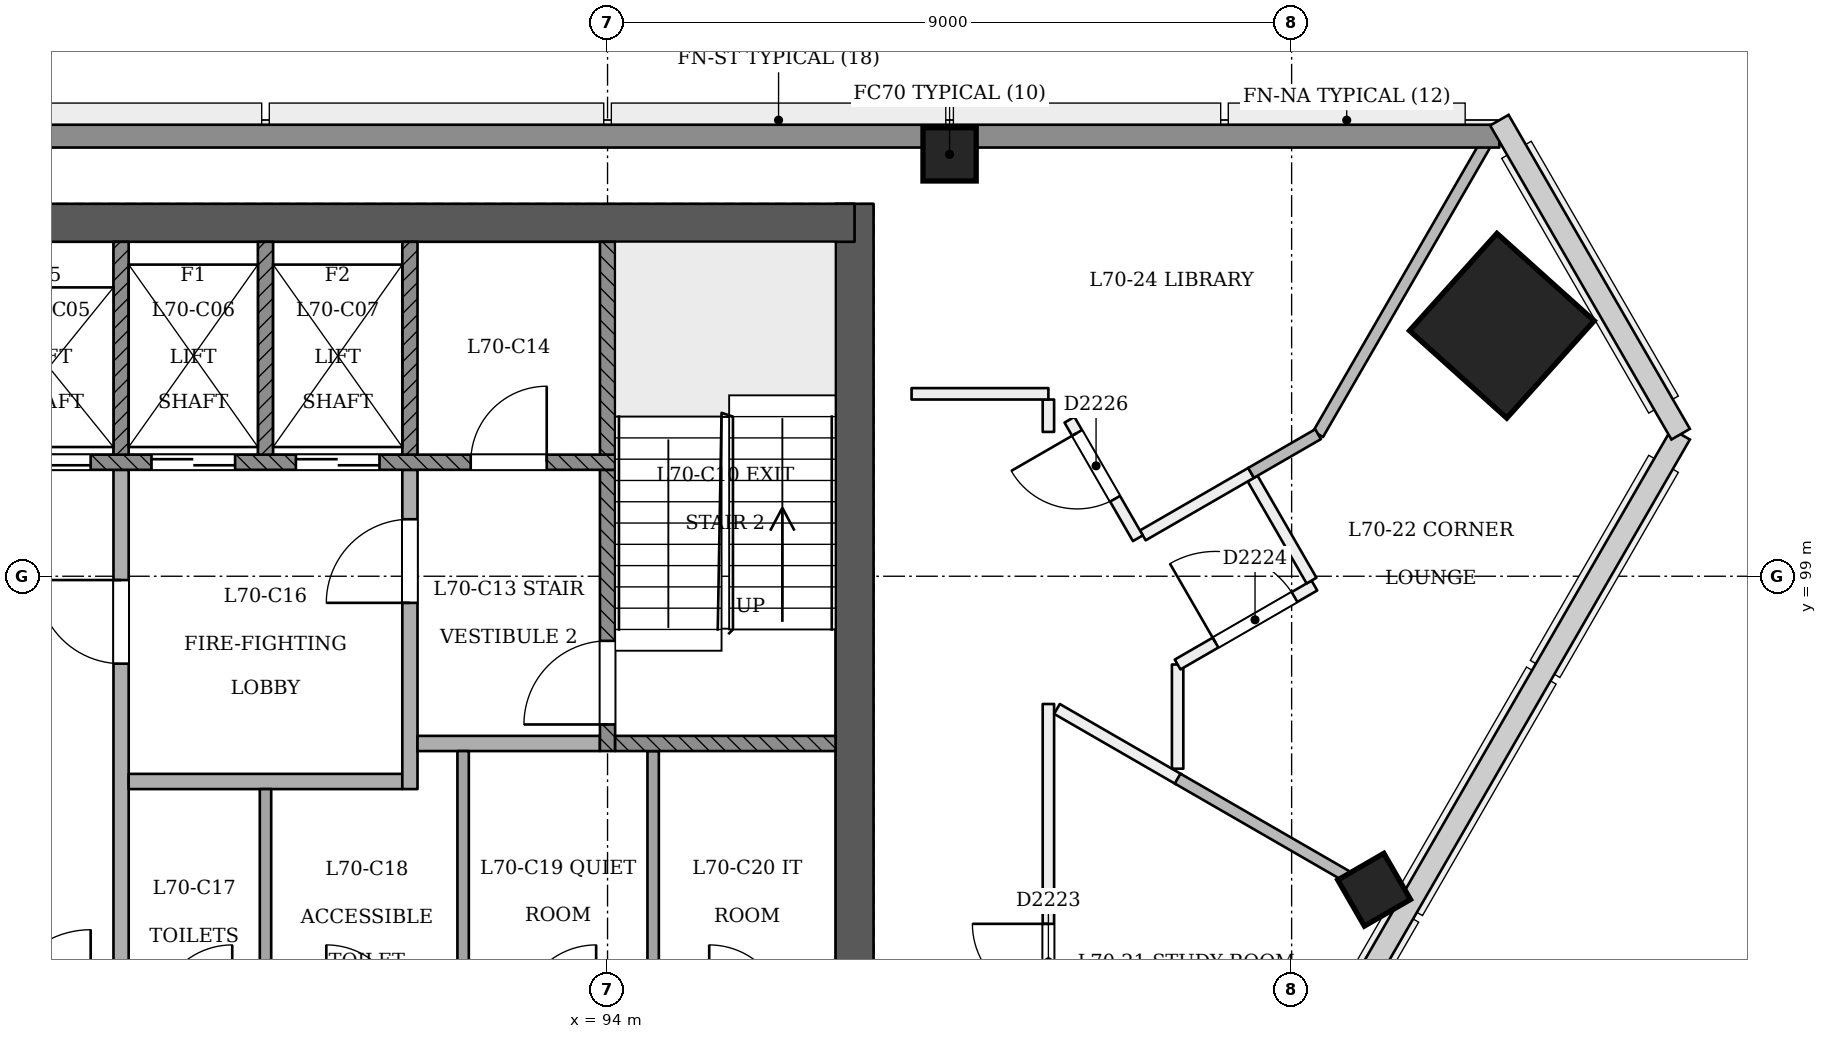
"""IFC4 building model, lengths in metres.
Left out: names, types, materials, properties, quantities, classifications, styles, units other than length and angle.
Written with IfcOpenShell. Run it as: python <this file> out.ifc"""

import sys

from ifc_helpers import new_model, si_unit, direction, frame, frame_2d, origin, origin_2d, place, context, subcontext, project, spatial, rectangle, extrude, element, fill, save


model = new_model("IFC4")
c1 = context("Model", 3, precision=1e-05, world=origin(), true_north=direction((0.0, 1.0)))
c2 = subcontext(c1, "Body", "Model", "MODEL_VIEW")
j1 = project(units=[si_unit("LENGTHUNIT", "METRE"), si_unit("PLANEANGLEUNIT", "RADIAN")], contexts=[c1])
p1 = place(None, origin())
s1 = spatial("IfcSite", under=j1, at=p1, CompositionType="ELEMENT")
p2 = place(p1, origin())
s2 = spatial("IfcBuilding", under=s1, at=p2, CompositionType="ELEMENT")
p3 = place(p2, frame((0.0, 0.0, 271.6)))
s3 = spatial("IfcBuildingStorey", under=s2, at=p3, CompositionType="ELEMENT", Elevation=271.6)
p4 = place(p3, frame((97.25, 93.15, 0.0), z_axis=(0.0, 0.0, 1.0), x_axis=(0.0, 1.0, 0.0)))
e1 = element("IfcWall", 1, at=p4, inside=s3, PredefinedType="SHEAR", context=c2, shape_type="SweptSolid", body=[
    extrude(rectangle(XDim=10.75, YDim=0.5, at=frame_2d((5.375, 0.0))), origin(), (0.0, 0.0, 1.0), 3.6),
])
p5 = place(p3, frame((97.25, 103.65, 0.0), z_axis=(0.0, 0.0, 1.0), x_axis=(-1.0, 0.0, 0.0)))
e2 = element("IfcWall", 2, at=p5, inside=s3, PredefinedType="SHEAR", context=c2, shape_type="SweptSolid", body=[
    extrude(rectangle(XDim=24.75, YDim=0.5, at=frame_2d((12.375, 0.0))), origin(), (0.0, 0.0, 1.0), 3.6),
])
p6 = place(p3, frame((105.8, 102.284, 0.0), z_axis=(-0.028403739082, 0.009219352065, 0.999554016126), x_axis=(0.500765083006, -0.865298216412, 0.022210995403)))
e3 = element("IfcColumn", 3, at=p6, inside=s3, PredefinedType="COLUMN", context=c2, shape_type="SweptSolid", body=[
    extrude(rectangle(XDim=1.72, YDim=1.72, at=origin_2d()), origin(), (0.0, 0.0, 1.0), 3.602),
])
p7 = place(p3, frame((98.5, 104.55, 0.0), z_axis=(0.0, 0.0, 1.0), x_axis=(1.0, 0.0, 0.0)))
e4 = element("IfcColumn", 4, at=p7, inside=s3, PredefinedType="COLUMN", context=c2, shape_type="SweptSolid", body=[
    extrude(rectangle(XDim=0.7, YDim=0.7, at=origin_2d()), origin(), (0.0, 0.0, 1.0), 3.6),
])
p8 = place(p3, frame((104.113, 94.829, -0.021), z_axis=(-0.022222852987, 0.038483477124, 0.999012095419), x_axis=(-0.500174611287, -0.865639447942, 0.022219459744)))
e5 = element("IfcColumn", 5, at=p8, inside=s3, PredefinedType="COLUMN", context=c2, shape_type="SweptSolid", body=[
    extrude(rectangle(XDim=0.7, YDim=0.7, at=origin_2d()), origin(), (0.0, 0.0, 1.0), 3.604),
])
p9 = place(p3, frame((99.8, 90.6, 0.0), z_axis=(0.0, 0.0, 1.0), x_axis=(0.0, 1.0, 0.0)))
e6 = element("IfcWall", 6, at=p9, inside=s3, PredefinedType="PARTITIONING", context=c2, shape_type="SweptSolid", body=[
    extrude(rectangle(XDim=6.719, YDim=0.15, at=frame_2d((3.36, 0.0))), origin(), (0.0, 0.0, 1.0), 3.2),
])
p10 = place(p9, frame((2.827, 0.0, 0.0)))
e7 = element("IfcOpeningElement", 7, at=p10, cuts=e6, PredefinedType="OPENING", context=c2, shape_type="SweptSolid", body=[
    extrude(rectangle(XDim=1.0, YDim=2.1, at=frame_2d((0.5, 1.05))), frame((0.0, 0.085, 0.0), z_axis=(0.0, -1.0, 0.0), x_axis=(1.0, 0.0, 0.0)), (0.0, 0.0, 1.0), 0.171),
])
p11 = place(p3, frame((99.913, 97.254, 0.0), z_axis=(0.0, 0.0, 1.0), x_axis=(0.866021029023, -0.500007577232, 0.0)))
e8 = element("IfcWall", 8, at=p11, inside=s3, PredefinedType="PARTITIONING", context=c2, shape_type="SweptSolid", body=[
    extrude(rectangle(XDim=1.853, YDim=0.15, at=frame_2d((0.927, 0.0))), origin(), (0.0, 0.0, 1.0), 3.2),
])
p12 = place(p3, frame((101.5, 96.468, 0.0), z_axis=(0.0, 0.0, 1.0), x_axis=(0.0, 1.0, 0.0)))
e9 = element("IfcWall", 9, at=p12, inside=s3, PredefinedType="PARTITIONING", context=c2, shape_type="SweptSolid", body=[
    extrude(rectangle(XDim=1.371, YDim=0.15, at=frame_2d((0.686, 0.0))), origin(), (0.0, 0.0, 1.0), 3.2),
])
p13 = place(p3, frame((101.5, 97.839, 0.0), z_axis=(0.0, 0.0, 1.0), x_axis=(0.866029041019, 0.499993700073, 0.0)))
e10 = element("IfcWall", 10, at=p13, inside=s3, PredefinedType="PARTITIONING", context=c2, shape_type="SweptSolid", body=[
    extrude(rectangle(XDim=2.078, YDim=0.15, at=frame_2d((1.039, 0.0))), origin(), (0.0, 0.0, 1.0), 3.2),
])
p14 = place(p13, frame((0.576, 0.0, 0.0)))
e11 = element("IfcOpeningElement", 11, at=p14, cuts=e10, PredefinedType="OPENING", context=c2, shape_type="SweptSolid", body=[
    extrude(rectangle(XDim=1.2, YDim=2.1, at=frame_2d((0.6, 1.05))), frame((0.0, 0.085, 0.0), z_axis=(0.0, -1.0, 0.0), x_axis=(1.0, 0.0, 0.0)), (0.0, 0.0, 1.0), 0.171),
])
p15 = place(p3, frame((103.262, 98.943, 0.0), z_axis=(0.0, 0.0, 1.0), x_axis=(-0.499899694197, 0.866083307622, 0.0)))
e12 = element("IfcWall", 12, at=p15, inside=s3, PredefinedType="PARTITIONING", context=c2, shape_type="SweptSolid", body=[
    extrude(rectangle(XDim=1.55, YDim=0.15, at=frame_2d((0.775, 0.0))), origin(), (0.0, 0.0, 1.0), 3.2),
])
p16 = place(p3, frame((102.467, 100.36, 0.0), z_axis=(0.0, 0.0, 1.0), x_axis=(-0.866015045157, -0.50001794124, 0.0)))
e13 = element("IfcWall", 13, at=p16, inside=s3, PredefinedType="PARTITIONING", context=c2, shape_type="SweptSolid", body=[
    extrude(rectangle(XDim=1.645, YDim=0.15, at=frame_2d((0.823, 0.0))), origin(), (0.0, 0.0, 1.0), 3.2),
])
p17 = place(p3, frame((100.977, 99.5, 0.0), z_axis=(0.0, 0.0, 1.0), x_axis=(-0.499961193289, 0.866047807691, 0.0)))
e14 = element("IfcWall", 14, at=p17, inside=s3, PredefinedType="PARTITIONING", context=c2, shape_type="SweptSolid", body=[
    extrude(rectangle(XDim=1.8, YDim=0.15, at=frame_2d((0.9, 0.0))), origin(), (0.0, 0.0, 1.0), 3.2),
])
p18 = place(p17, frame((0.6, 0.0, 0.0)))
e15 = element("IfcOpeningElement", 15, at=p18, cuts=e14, PredefinedType="OPENING", context=c2, shape_type="SweptSolid", body=[
    extrude(rectangle(XDim=1.0, YDim=2.1, at=frame_2d((0.5, 1.05))), frame((0.0, 0.085, 0.0), z_axis=(0.0, -1.0, 0.0), x_axis=(1.0, 0.0, 0.0)), (0.0, 0.0, 1.0), 0.171),
])
p19 = place(p3, frame((99.8, 100.899, 0.0), z_axis=(0.0, 0.0, 1.0), x_axis=(0.0, 1.0, 0.0)))
e16 = element("IfcWall", 16, at=p19, inside=s3, PredefinedType="PARTITIONING", context=c2, shape_type="SweptSolid", body=[
    extrude(rectangle(XDim=0.426, YDim=0.15, at=frame_2d((0.213, 0.0))), origin(), (0.0, 0.0, 1.0), 3.2),
])
p20 = place(p3, frame((99.8, 101.4, 0.0), z_axis=(0.0, 0.0, 1.0), x_axis=(-1.0, 0.0, 0.0)))
e17 = element("IfcWall", 17, at=p20, inside=s3, PredefinedType="PARTITIONING", context=c2, shape_type="SweptSolid", body=[
    extrude(rectangle(XDim=1.8, YDim=0.15, at=frame_2d((0.9, 0.0))), origin(), (0.0, 0.0, 1.0), 3.2),
])
p21 = place(p3, frame((104.415, 94.655, 0.0), z_axis=(0.0, 0.0, 1.0), x_axis=(-0.866011654119, 0.500023814363, 0.0)))
e18 = element("IfcWall", 18, at=p21, inside=s3, PredefinedType="PARTITIONING", context=c2, shape_type="SweptSolid", body=[
    extrude(rectangle(XDim=3.366, YDim=0.15, at=frame_2d((1.683, 0.0))), origin(), (0.0, 0.0, 1.0), 2.7),
])
p22 = place(p3, frame((105.675, 104.9, 0.0), z_axis=(0.0, 0.0, 1.0), x_axis=(-0.500014543469, -0.866017006946, 0.0)))
e19 = element("IfcWall", 19, at=p22, inside=s3, PredefinedType="PARTITIONING", context=c2, shape_type="SweptSolid", body=[
    extrude(rectangle(XDim=4.655, YDim=0.15, at=frame_2d((2.327, 0.0))), origin(), (0.0, 0.0, 1.0), 2.7),
])
p23 = place(p3, frame((103.348, 100.869, 0.0), z_axis=(0.0, 0.0, 1.0), x_axis=(-0.866049759928, -0.499957811549, 0.0)))
e20 = element("IfcWall", 20, at=p23, inside=s3, PredefinedType="PARTITIONING", context=c2, shape_type="SweptSolid", body=[
    extrude(rectangle(XDim=1.018, YDim=0.15, at=frame_2d((0.509, 0.0))), origin(), (0.0, 0.0, 1.0), 3.2),
])
p24 = place(p3, frame((64.267, 104.79, 0.0), z_axis=(0.0, 0.0, 1.0), x_axis=(1.0, 0.0, 0.0)))
e21 = element("IfcWall", 21, at=p24, inside=s3, PredefinedType="SOLIDWALL", context=c2, shape_type="SweptSolid", body=[
    extrude(rectangle(XDim=41.466, YDim=0.3, at=frame_2d((20.733, 0.0))), origin(), (0.0, 0.0, 1.0), 2.7),
])
p25 = place(p3, frame((87.6, 93.4, 0.0), z_axis=(0.0, 0.0, 1.0), x_axis=(0.0, 1.0, 0.0)))
e22 = element("IfcWall", 22, at=p25, inside=s3, PredefinedType="PARTITIONING", context=c2, shape_type="SweptSolid", body=[
    extrude(rectangle(XDim=7.0, YDim=0.2, at=frame_2d((3.5, 0.0))), origin(), (0.0, 0.0, 1.0), 3.2),
])
p26 = place(p25, frame((4.45, 0.0, 0.0)))
e23 = element("IfcOpeningElement", 23, at=p26, cuts=e22, PredefinedType="OPENING", context=c2, shape_type="SweptSolid", body=[
    extrude(rectangle(XDim=1.1, YDim=2.1, at=frame_2d((0.55, 1.05))), frame((0.0, 0.11, 0.0), z_axis=(0.0, -1.0, 0.0), x_axis=(1.0, 0.0, 0.0)), (0.0, 0.0, 1.0), 0.221),
])
p27 = place(p3, frame((89.5, 93.4, 0.0), z_axis=(0.0, 0.0, 1.0), x_axis=(0.0, 1.0, 0.0)))
e24 = element("IfcWall", 24, at=p27, inside=s3, PredefinedType="PARTITIONING", context=c2, shape_type="SweptSolid", body=[
    extrude(rectangle(XDim=2.8, YDim=0.15, at=frame_2d((1.4, 0.0))), origin(), (0.0, 0.0, 1.0), 3.2),
])
for number, where, z_axis, x_axis in (
    (25, (92.1, 93.4, 0.0), (0.0, 0.0, 1.0), (0.0, 1.0, 0.0)),
    (26, (94.6, 93.4, 0.0), (0.0, 0.0, 1.0), (0.0, 1.0, 0.0)),
):
    element("IfcWall", number, at=place(p3, frame(where, z_axis=z_axis, x_axis=x_axis)), inside=s3, PredefinedType="PARTITIONING", context=c2, shape_type="SweptSolid", body=[
        extrude(rectangle(XDim=3.3, YDim=0.15, at=frame_2d((1.65, 0.0))), origin(), (0.0, 0.0, 1.0), 3.2),
    ])
p28 = place(p3, frame((87.7, 96.3, 0.0), z_axis=(0.0, 0.0, 1.0), x_axis=(1.0, 0.0, 0.0)))
e27 = element("IfcWall", 27, at=p28, inside=s3, PredefinedType="PARTITIONING", context=c2, shape_type="SweptSolid", body=[
    extrude(rectangle(XDim=3.6, YDim=0.2, at=frame_2d((1.8, 0.0))), origin(), (0.0, 0.0, 1.0), 3.2),
])
p29 = place(p3, frame((91.4, 96.2, 0.0), z_axis=(0.0, 0.0, 1.0), x_axis=(0.0, 1.0, 0.0)))
e28 = element("IfcWall", 28, at=p29, inside=s3, PredefinedType="PARTITIONING", context=c2, shape_type="SweptSolid", body=[
    extrude(rectangle(XDim=4.2, YDim=0.2, at=frame_2d((2.1, 0.0))), origin(), (0.0, 0.0, 1.0), 3.2),
])
p30 = place(p29, frame((2.45, 0.0, 0.0)))
e29 = element("IfcOpeningElement", 29, at=p30, cuts=e28, PredefinedType="OPENING", context=c2, shape_type="SweptSolid", body=[
    extrude(rectangle(XDim=1.1, YDim=2.1, at=frame_2d((0.55, 1.05))), frame((0.0, 0.11, 0.0), z_axis=(0.0, -1.0, 0.0), x_axis=(1.0, 0.0, 0.0)), (0.0, 0.0, 1.0), 0.221),
])
p31 = place(p3, frame((91.5, 96.8, 0.0), z_axis=(0.0, 0.0, 1.0), x_axis=(1.0, 0.0, 0.0)))
e30 = element("IfcWall", 30, at=p31, inside=s3, PredefinedType="PARTITIONING", context=c2, shape_type="SweptSolid", body=[
    extrude(rectangle(XDim=2.4, YDim=0.2, at=frame_2d((1.2, 0.0))), origin(), (0.0, 0.0, 1.0), 3.2),
])
p32 = place(p3, frame((94.0, 96.7, 0.0), z_axis=(0.0, 0.0, 1.0), x_axis=(0.0, 1.0, 0.0)))
e31 = element("IfcWall", 31, at=p32, inside=s3, PredefinedType="SOLIDWALL", context=c2, shape_type="SweptSolid", body=[
    extrude(rectangle(XDim=3.7, YDim=0.2, at=frame_2d((1.85, 0.0))), origin(), (0.0, 0.0, 1.0), 3.2),
])
p33 = place(p32, frame((0.35, 0.0, 0.0)))
e32 = element("IfcOpeningElement", 32, at=p33, cuts=e31, PredefinedType="OPENING", context=c2, shape_type="SweptSolid", body=[
    extrude(rectangle(XDim=1.1, YDim=2.1, at=frame_2d((0.55, 1.05))), frame((0.0, 0.11, 0.0), z_axis=(0.0, -1.0, 0.0), x_axis=(1.0, 0.0, 0.0)), (0.0, 0.0, 1.0), 0.221),
])
p34 = place(p3, frame((94.1, 96.8, 0.0), z_axis=(0.0, 0.0, 1.0), x_axis=(1.0, 0.0, 0.0)))
e33 = element("IfcWall", 33, at=p34, inside=s3, PredefinedType="SOLIDWALL", context=c2, shape_type="SweptSolid", body=[
    extrude(rectangle(XDim=2.9, YDim=0.2, at=frame_2d((1.45, 0.0))), origin(), (0.0, 0.0, 1.0), 3.2),
])
p35 = place(p3, frame((75.9, 100.5, 0.0), z_axis=(0.0, 0.0, 1.0), x_axis=(1.0, 0.0, 0.0)))
e34 = element("IfcWall", 34, at=p35, inside=s3, PredefinedType="SOLIDWALL", context=c2, shape_type="SweptSolid", body=[
    extrude(rectangle(XDim=18.2, YDim=0.2, at=frame_2d((9.1, 0.0))), origin(), (0.0, 0.0, 1.0), 3.2),
])
p36 = place(p35, frame((2.6, 0.0, 0.0)))
e35 = element("IfcOpeningElement", 35, at=p36, cuts=e34, PredefinedType="OPENING", context=c2, shape_type="SweptSolid", body=[
    extrude(rectangle(XDim=1.1, YDim=2.1, at=frame_2d((0.55, 1.05))), frame((0.0, 0.11, 0.0), z_axis=(0.0, -1.0, 0.0), x_axis=(1.0, 0.0, 0.0)), (0.0, 0.0, 1.0), 0.221),
])
p37 = place(p35, frame((4.5, 0.0, 0.0)))
e36 = element("IfcOpeningElement", 36, at=p37, cuts=e34, PredefinedType="OPENING", context=c2, shape_type="SweptSolid", body=[
    extrude(rectangle(XDim=1.1, YDim=2.1, at=frame_2d((0.55, 1.05))), frame((0.0, 0.11, 0.0), z_axis=(0.0, -1.0, 0.0), x_axis=(1.0, 0.0, 0.0)), (0.0, 0.0, 1.0), 0.221),
])
p38 = place(p35, frame((6.4, 0.0, 0.0)))
e37 = element("IfcOpeningElement", 37, at=p38, cuts=e34, PredefinedType="OPENING", context=c2, shape_type="SweptSolid", body=[
    extrude(rectangle(XDim=1.1, YDim=2.1, at=frame_2d((0.55, 1.05))), frame((0.0, 0.11, 0.0), z_axis=(0.0, -1.0, 0.0), x_axis=(1.0, 0.0, 0.0)), (0.0, 0.0, 1.0), 0.221),
])
p39 = place(p35, frame((8.3, 0.0, 0.0)))
e38 = element("IfcOpeningElement", 38, at=p39, cuts=e34, PredefinedType="OPENING", context=c2, shape_type="SweptSolid", body=[
    extrude(rectangle(XDim=1.1, YDim=2.1, at=frame_2d((0.55, 1.05))), frame((0.0, 0.11, 0.0), z_axis=(0.0, -1.0, 0.0), x_axis=(1.0, 0.0, 0.0)), (0.0, 0.0, 1.0), 0.221),
])
p40 = place(p35, frame((10.2, 0.0, 0.0)))
e39 = element("IfcOpeningElement", 39, at=p40, cuts=e34, PredefinedType="OPENING", context=c2, shape_type="SweptSolid", body=[
    extrude(rectangle(XDim=1.1, YDim=2.1, at=frame_2d((0.55, 1.05))), frame((0.0, 0.11, 0.0), z_axis=(0.0, -1.0, 0.0), x_axis=(1.0, 0.0, 0.0)), (0.0, 0.0, 1.0), 0.221),
])
p41 = place(p35, frame((12.1, 0.0, 0.0)))
e40 = element("IfcOpeningElement", 40, at=p41, cuts=e34, PredefinedType="OPENING", context=c2, shape_type="SweptSolid", body=[
    extrude(rectangle(XDim=1.1, YDim=2.1, at=frame_2d((0.55, 1.05))), frame((0.0, 0.11, 0.0), z_axis=(0.0, -1.0, 0.0), x_axis=(1.0, 0.0, 0.0)), (0.0, 0.0, 1.0), 0.221),
])
p42 = place(p35, frame((14.0, 0.0, 0.0)))
e41 = element("IfcOpeningElement", 41, at=p42, cuts=e34, PredefinedType="OPENING", context=c2, shape_type="SweptSolid", body=[
    extrude(rectangle(XDim=1.1, YDim=2.1, at=frame_2d((0.55, 1.05))), frame((0.0, 0.11, 0.0), z_axis=(0.0, -1.0, 0.0), x_axis=(1.0, 0.0, 0.0)), (0.0, 0.0, 1.0), 0.221),
])
p43 = place(p35, frame((0.65, 0.0, 0.0)))
e42 = element("IfcOpeningElement", 42, at=p43, cuts=e34, PredefinedType="OPENING", context=c2, shape_type="SweptSolid", body=[
    extrude(rectangle(XDim=1.0, YDim=2.1, at=frame_2d((0.5, 1.05))), frame((0.0, 0.11, 0.0), z_axis=(0.0, -1.0, 0.0), x_axis=(1.0, 0.0, 0.0)), (0.0, 0.0, 1.0), 0.221),
])
p44 = place(p35, frame((16.3, 0.0, 0.0)))
e43 = element("IfcOpeningElement", 43, at=p44, cuts=e34, PredefinedType="OPENING", context=c2, shape_type="SweptSolid", body=[
    extrude(rectangle(XDim=1.0, YDim=2.1, at=frame_2d((0.5, 1.05))), frame((0.0, 0.11, 0.0), z_axis=(0.0, -1.0, 0.0), x_axis=(1.0, 0.0, 0.0)), (0.0, 0.0, 1.0), 0.221),
])
for number, where, z_axis, x_axis in (
    (44, (87.6, 100.6, 0.0), (0.0, 0.0, 1.0), (0.0, 1.0, 0.0)),
    (45, (89.5, 100.6, 0.0), (0.0, 0.0, 1.0), (0.0, 1.0, 0.0)),
    (46, (91.4, 100.6, 0.0), (0.0, 0.0, 1.0), (0.0, 1.0, 0.0)),
    (47, (94.0, 100.6, 0.0), (0.0, 0.0, 1.0), (0.0, 1.0, 0.0)),
):
    element("IfcWall", number, at=place(p3, frame(where, z_axis=z_axis, x_axis=x_axis)), inside=s3, PredefinedType="SOLIDWALL", context=c2, shape_type="SweptSolid", body=[
        extrude(rectangle(XDim=2.8, YDim=0.2, at=frame_2d((1.4, 0.0))), origin(), (0.0, 0.0, 1.0), 3.2),
    ])
p45 = place(p10, origin())
e48 = element("IfcDoor", 48, at=p45, inside=s3, OperationType="SINGLE_SWING_RIGHT", PredefinedType="NOTDEFINED", context=c2, shape_type="SweptSolid", body=[
    extrude(rectangle(XDim=1.0, YDim=2.1, at=frame_2d((0.5, 1.05))), frame((0.0, 0.025, 0.0), z_axis=(0.0, -1.0, 0.0), x_axis=(1.0, 0.0, 0.0)), (0.0, 0.0, 1.0), 0.05),
])
fill(e7, e48)
p46 = place(p14, origin())
e49 = element("IfcDoor", 49, at=p46, inside=s3, OperationType="SINGLE_SWING_LEFT", PredefinedType="NOTDEFINED", context=c2, shape_type="SweptSolid", body=[
    extrude(rectangle(XDim=1.2, YDim=2.1, at=frame_2d((0.6, 1.05))), frame((0.0, 0.025, 0.0), z_axis=(0.0, -1.0, 0.0), x_axis=(1.0, 0.0, 0.0)), (0.0, 0.0, 1.0), 0.05),
])
fill(e11, e49)
p47 = place(p18, origin())
e50 = element("IfcDoor", 50, at=p47, inside=s3, OperationType="SINGLE_SWING_RIGHT", PredefinedType="NOTDEFINED", context=c2, shape_type="SweptSolid", body=[
    extrude(rectangle(XDim=1.0, YDim=2.1, at=frame_2d((0.5, 1.05))), frame((0.0, 0.025, 0.0), z_axis=(0.0, -1.0, 0.0), x_axis=(1.0, 0.0, 0.0)), (0.0, 0.0, 1.0), 0.05),
])
fill(e15, e50)
p48 = place(p40, origin())
e51 = element("IfcDoor", 51, at=p48, inside=s3, OperationType="SLIDING_TO_RIGHT", PredefinedType="NOTDEFINED", context=c2, shape_type="SweptSolid", body=[
    extrude(rectangle(XDim=1.1, YDim=2.1, at=frame_2d((0.55, 1.05))), frame((0.0, 0.025, 0.0), z_axis=(0.0, -1.0, 0.0), x_axis=(1.0, 0.0, 0.0)), (0.0, 0.0, 1.0), 0.05),
])
fill(e39, e51)
p49 = place(p41, origin())
e52 = element("IfcDoor", 52, at=p49, inside=s3, OperationType="SLIDING_TO_RIGHT", PredefinedType="NOTDEFINED", context=c2, shape_type="SweptSolid", body=[
    extrude(rectangle(XDim=1.1, YDim=2.1, at=frame_2d((0.55, 1.05))), frame((0.0, 0.025, 0.0), z_axis=(0.0, -1.0, 0.0), x_axis=(1.0, 0.0, 0.0)), (0.0, 0.0, 1.0), 0.05),
])
fill(e40, e52)
p50 = place(p42, origin())
e53 = element("IfcDoor", 53, at=p50, inside=s3, OperationType="SLIDING_TO_LEFT", PredefinedType="NOTDEFINED", context=c2, shape_type="SweptSolid", body=[
    extrude(rectangle(XDim=1.1, YDim=2.1, at=frame_2d((0.55, 1.05))), frame((0.0, 0.025, 0.0), z_axis=(0.0, -1.0, 0.0), x_axis=(1.0, 0.0, 0.0)), (0.0, 0.0, 1.0), 0.05),
])
fill(e41, e53)
p51 = place(p33, origin())
e54 = element("IfcDoor", 54, at=p51, inside=s3, OperationType="SINGLE_SWING_LEFT", PredefinedType="NOTDEFINED", context=c2, shape_type="SweptSolid", body=[
    extrude(rectangle(XDim=1.1, YDim=2.1, at=frame_2d((0.55, 1.05))), frame((0.0, 0.025, 0.0), z_axis=(0.0, -1.0, 0.0), x_axis=(1.0, 0.0, 0.0)), (0.0, 0.0, 1.0), 0.05),
])
fill(e32, e54)
p52 = place(p26, origin())
e55 = element("IfcDoor", 55, at=p52, inside=s3, OperationType="SINGLE_SWING_RIGHT", PredefinedType="NOTDEFINED", context=c2, shape_type="SweptSolid", body=[
    extrude(rectangle(XDim=1.1, YDim=2.1, at=frame_2d((0.55, 1.05))), frame((0.0, 0.025, 0.0), z_axis=(0.0, -1.0, 0.0), x_axis=(1.0, 0.0, 0.0)), (0.0, 0.0, 1.0), 0.05),
])
fill(e23, e55)
p53 = place(p30, origin())
e56 = element("IfcDoor", 56, at=p53, inside=s3, OperationType="SINGLE_SWING_LEFT", PredefinedType="NOTDEFINED", context=c2, shape_type="SweptSolid", body=[
    extrude(rectangle(XDim=1.1, YDim=2.1, at=frame_2d((0.55, 1.05))), frame((0.0, 0.025, 0.0), z_axis=(0.0, -1.0, 0.0), x_axis=(1.0, 0.0, 0.0)), (0.0, 0.0, 1.0), 0.05),
])
fill(e29, e56)
p54 = place(p44, origin())
e57 = element("IfcDoor", 57, at=p54, inside=s3, OperationType="SINGLE_SWING_RIGHT", PredefinedType="NOTDEFINED", context=c2, shape_type="SweptSolid", body=[
    extrude(rectangle(XDim=1.0, YDim=2.1, at=frame_2d((0.5, 1.05))), frame((0.0, 0.025, 0.0), z_axis=(0.0, -1.0, 0.0), x_axis=(1.0, 0.0, 0.0)), (0.0, 0.0, 1.0), 0.05),
])
fill(e43, e57)
save(model, sys.argv[1])
